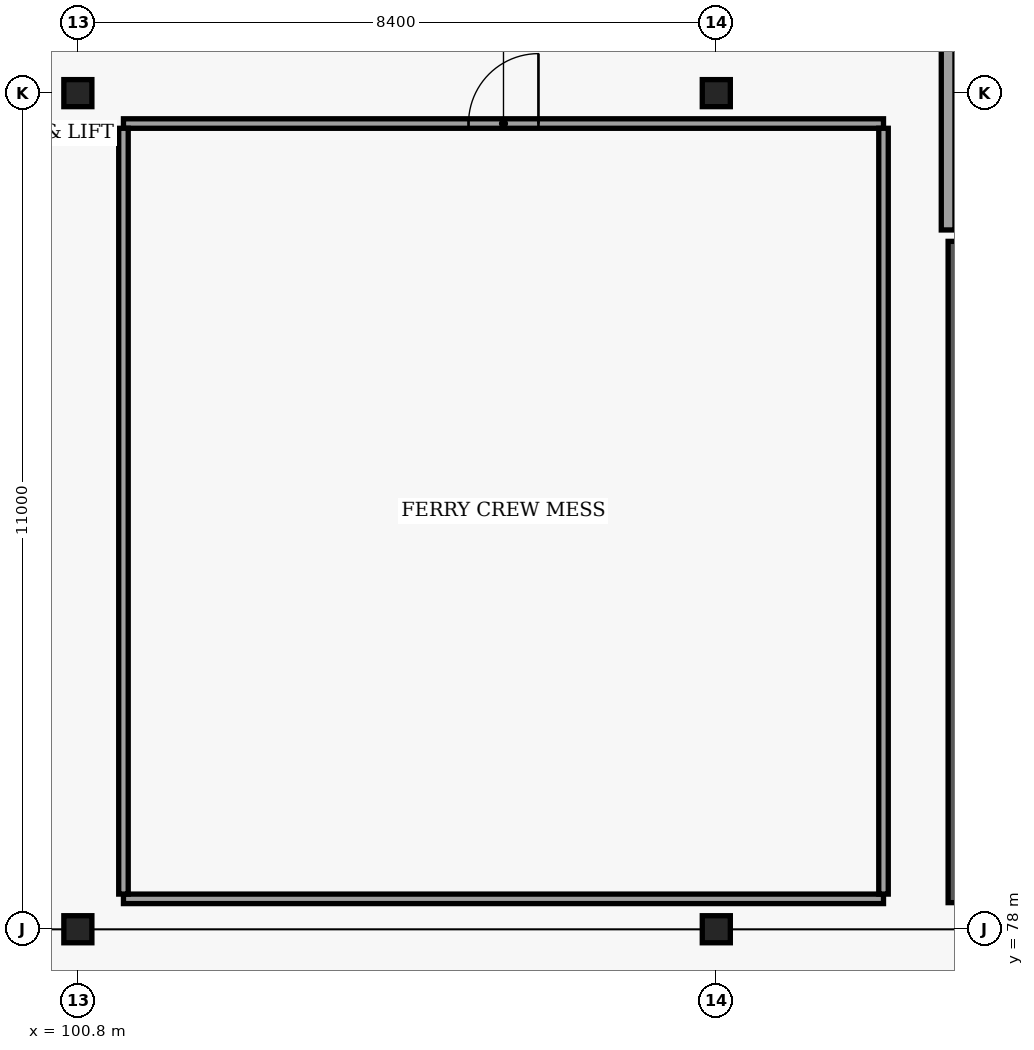
"""IFC4 building model, lengths in metres.
Left out: names, types, materials, properties, quantities, classifications, styles, units other than length and angle.
Written with IfcOpenShell. Run it as: python <this file> out.ifc"""

import sys

from ifc_helpers import new_model, si_unit, direction, frame, frame_2d, origin, origin_2d, place, context, subcontext, project, spatial, rectangle, i_section, extrude, element, fill, save


model = new_model("IFC4")
c1 = context("Model", 3, precision=1e-05, world=origin(), true_north=direction((0.0, 1.0)))
c2 = subcontext(c1, "Body", "Model", "MODEL_VIEW")
j1 = project(units=[si_unit("LENGTHUNIT", "METRE"), si_unit("PLANEANGLEUNIT", "RADIAN")], contexts=[c1])
p1 = place(None, origin())
s1 = spatial("IfcSite", under=j1, at=p1, CompositionType="ELEMENT")
p2 = place(p1, origin())
s2 = spatial("IfcBuilding", under=s1, at=p2, CompositionType="ELEMENT")
p3 = place(p2, frame((0.0, 0.0, 5.4)))
s3 = spatial("IfcBuildingStorey", under=s2, at=p3, CompositionType="ELEMENT", Elevation=5.4)
for number, where, z_axis, x_axis in (
    (1, (100.8, 78.0, 0.0), (0.0, 0.0, 1.0), (1.0, 0.0, 0.0)),
    (2, (109.2, 78.0, 0.0), (0.0, 0.0, 1.0), (1.0, 0.0, 0.0)),
    (3, (100.8, 89.0, 0.0), (0.0, 0.0, 1.0), (1.0, 0.0, 0.0)),
    (4, (109.2, 89.0, 0.0), (0.0, 0.0, 1.0), (1.0, 0.0, 0.0)),
):
    element("IfcColumn", number, at=place(p3, frame(where, z_axis=z_axis, x_axis=x_axis)), inside=s3, PredefinedType="COLUMN", context=c2, shape_type="SweptSolid", body=[
        extrude(i_section(OverallWidth=0.369, OverallDepth=0.356, WebThickness=0.011, FlangeThickness=0.018, FilletRadius=0.015, at=origin_2d()), origin(), (0.0, 0.0, 1.0), 4.5),
    ])
p4 = place(p3, frame((112.4, 78.35, 0.0), z_axis=(0.0, 0.0, 1.0), x_axis=(0.0, 1.0, 0.0)))
e5 = element("IfcWall", 5, at=p4, inside=s3, PredefinedType="SHEAR", context=c2, shape_type="SweptSolid", body=[
    extrude(rectangle(XDim=8.7, YDim=0.3, at=frame_2d((4.35, 0.0))), origin(), (0.0, 0.0, 1.0), 4.5),
])
p5 = place(p3, frame((112.25, 87.2, 0.0), z_axis=(0.0, 0.0, 1.0), x_axis=(0.0, 1.0, 0.0)))
e6 = element("IfcWall", 6, at=p5, inside=s3, PredefinedType="SOLIDWALL", context=c2, shape_type="SweptSolid", body=[
    extrude(rectangle(XDim=2.51, YDim=0.18, at=frame_2d((1.255, 0.0))), origin(), (0.0, 0.0, 1.0), 4.04),
])
p6 = place(p3, frame((101.4, 78.4, 0.0), z_axis=(0.0, 0.0, 1.0), x_axis=(1.0, 0.0, 0.0)))
e7 = element("IfcWall", 7, at=p6, inside=s3, PredefinedType="PARTITIONING", context=c2, shape_type="SweptSolid", body=[
    extrude(rectangle(XDim=10.0, YDim=0.125, at=frame_2d((5.0, 0.0))), origin(), (0.0, 0.0, 1.0), 4.083),
])
p7 = place(p3, frame((101.4, 88.6, 0.0), z_axis=(0.0, 0.0, 1.0), x_axis=(1.0, 0.0, 0.0)))
e8 = element("IfcWall", 8, at=p7, inside=s3, PredefinedType="PARTITIONING", context=c2, shape_type="SweptSolid", body=[
    extrude(rectangle(XDim=10.0, YDim=0.125, at=frame_2d((5.0, 0.0))), origin(), (0.0, 0.0, 1.0), 4.083),
])
p8 = place(p7, frame((4.54, 0.0, 0.0)))
e9 = element("IfcOpeningElement", 9, at=p8, cuts=e8, PredefinedType="OPENING", context=c2, shape_type="SweptSolid", body=[
    extrude(rectangle(XDim=0.92, YDim=2.15, at=frame_2d((0.46, 1.075))), frame((0.0, 0.073, 0.0), z_axis=(0.0, -1.0, 0.0), x_axis=(1.0, 0.0, 0.0)), (0.0, 0.0, 1.0), 0.145),
])
p9 = place(p3, frame((101.4, 78.462, 0.0), z_axis=(0.0, 0.0, 1.0), x_axis=(0.0, 1.0, 0.0)))
e10 = element("IfcWall", 10, at=p9, inside=s3, PredefinedType="PARTITIONING", context=c2, shape_type="SweptSolid", body=[
    extrude(rectangle(XDim=10.075, YDim=0.125, at=frame_2d((5.038, 0.0))), origin(), (0.0, 0.0, 1.0), 4.187),
])
p10 = place(p3, frame((111.4, 78.462, 0.0), z_axis=(0.0, 0.0, 1.0), x_axis=(0.0, 1.0, 0.0)))
e11 = element("IfcWall", 11, at=p10, inside=s3, PredefinedType="PARTITIONING", context=c2, shape_type="SweptSolid", body=[
    extrude(rectangle(XDim=10.075, YDim=0.125, at=frame_2d((5.038, 0.0))), origin(), (0.0, 0.0, 1.0), 4.5),
])
p11 = place(p8, origin())
e12 = element("IfcDoor", 12, at=p11, inside=s3, OperationType="SINGLE_SWING_RIGHT", PredefinedType="DOOR", context=c2, shape_type="SweptSolid", body=[
    extrude(rectangle(XDim=0.92, YDim=2.15, at=frame_2d((0.46, 1.075))), frame((0.0, 0.025, 0.0), z_axis=(0.0, -1.0, 0.0), x_axis=(1.0, 0.0, 0.0)), (0.0, 0.0, 1.0), 0.05),
])
fill(e9, e12)
save(model, sys.argv[1])
